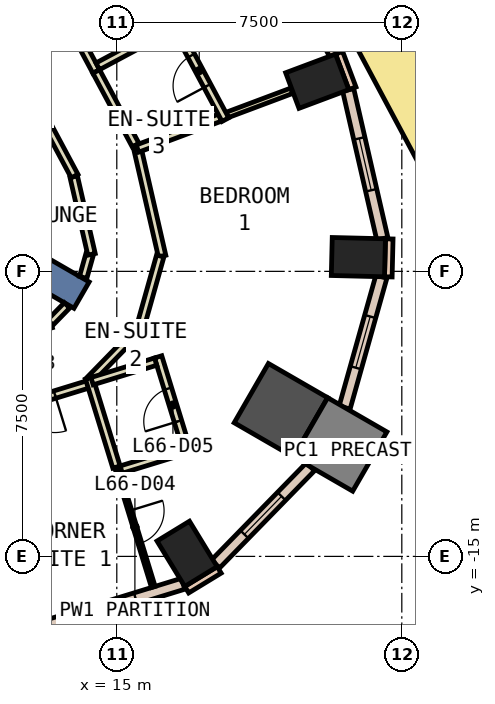
"""IFC4 building model, lengths in metres.
Left out: names, types, materials, properties, quantities, classifications, styles, units other than length and angle.
Written with IfcOpenShell. Run it as: python <this file> out.ifc"""

import sys

from ifc_helpers import new_model, si_unit, direction, frame, frame_2d, origin, origin_2d, place, context, subcontext, project, spatial, rectangle, extrude, element, fill, save


model = new_model("IFC4")
c1 = context("Model", 3, precision=1e-05, world=origin(), true_north=direction((0.0, 1.0)))
c2 = subcontext(c1, "Body", "Model", "MODEL_VIEW")
j1 = project(units=[si_unit("LENGTHUNIT", "METRE"), si_unit("PLANEANGLEUNIT", "RADIAN")], contexts=[c1])
p1 = place(None, origin())
s1 = spatial("IfcSite", under=j1, at=p1, CompositionType="ELEMENT")
p2 = place(p1, origin())
s2 = spatial("IfcBuilding", under=s1, at=p2, CompositionType="ELEMENT")
p3 = place(p2, frame((0.0, 0.0, 286.4)))
s3 = spatial("IfcBuildingStorey", under=s2, at=p3, CompositionType="ELEMENT", Elevation=286.4)
p4 = place(p3, frame((16.85, -14.933, 0.0), z_axis=(0.0, 0.0, 1.0), x_axis=(0.853650808213, 0.520845752251, 0.0)))
e1 = element("IfcColumn", 1, at=p4, inside=s3, PredefinedType="COLUMN", context=c2, shape_type="SweptSolid", body=[
    extrude(rectangle(XDim=1.0, YDim=1.4, at=origin_2d()), origin(), (0.0, 0.0, 1.0), 3.26),
])
p5 = place(p3, frame((19.319, -11.154, 0.0), z_axis=(0.0, 0.0, 1.0), x_axis=(-0.866025403784, 0.5, 0.0)))
e2 = element("IfcColumn", 2, at=p5, inside=s3, PredefinedType="COLUMN", context=c2, shape_type="SweptSolid", body=[
    extrude(rectangle(XDim=1.8, YDim=1.8, at=origin_2d()), origin(), (0.0, 0.0, 1.0), 3.26),
])
for number, where, z_axis, x_axis in (
    (3, (21.357, -7.126, 0.0), (0.0, 0.0, 1.0), (0.024, 1.0, 0.0)),
    (4, (20.275, -2.497, 0.0), (0.0, 0.0, 1.0), (-0.351, 0.936, 0.0)),
):
    element("IfcColumn", number, at=place(p3, frame(where, z_axis=z_axis, x_axis=x_axis)), inside=s3, PredefinedType="COLUMN", context=c2, shape_type="SweptSolid", body=[
        extrude(rectangle(XDim=1.0, YDim=1.4, at=origin_2d()), origin(), (0.0, 0.0, 1.0), 3.26),
    ])
p6 = place(p3, frame((20.878, -12.054, 0.0), z_axis=(0.0, 0.0, 1.0), x_axis=(-0.866025403784, 0.5, 0.0)))
e5 = element("IfcColumn", 5, at=p6, inside=s3, PredefinedType="COLUMN", context=c2, shape_type="SweptSolid", body=[
    extrude(rectangle(XDim=1.8, YDim=1.8, at=origin_2d()), origin(), (0.0, 0.0, 1.0), 3.26),
])
p7 = place(p3, frame((6.279, -3.625, -0.6), z_axis=(0.0, 0.0, 1.0), x_axis=(0.866017533419, -0.500013631625, 0.0)))
e6 = element("IfcWall", 6, at=p7, inside=s3, PredefinedType="SHEAR", context=c2, shape_type="SweptSolid", body=[
    extrude(rectangle(XDim=9.0, YDim=0.8, at=frame_2d((4.5, 0.0))), origin(), (0.0, 0.0, 1.0), 3.86),
])
p8 = place(p3, frame((21.2, -2.684, 0.0), z_axis=(0.0, 0.0, 1.0), x_axis=(-0.350962844851, 0.936389385637, 0.0)))
e7 = element("IfcWall", 7, at=p8, inside=s3, PredefinedType="STANDARD", context=c2, shape_type="SweptSolid", body=[
    extrude(rectangle(XDim=1.0, YDim=0.2, at=frame_2d((0.5, 0.0))), origin(), (0.0, 0.0, 1.0), 3.26),
])
p9 = place(p3, frame((16.84, -15.876, 0.0), z_axis=(0.0, 0.0, 1.0), x_axis=(0.853679739553, 0.520798331677, 0.0)))
e8 = element("IfcWall", 8, at=p9, inside=s3, PredefinedType="STANDARD", context=c2, shape_type="SweptSolid", body=[
    extrude(rectangle(XDim=1.0, YDim=0.2, at=frame_2d((0.5, 0.0))), origin(), (0.0, 0.0, 1.0), 3.26),
])
p10 = place(p3, frame((22.145, -7.645, 0.0), z_axis=(0.0, 0.0, 1.0), x_axis=(0.023942303888, 0.999713341956, 0.0)))
e9 = element("IfcWall", 9, at=p10, inside=s3, PredefinedType="STANDARD", context=c2, shape_type="SweptSolid", body=[
    extrude(rectangle(XDim=0.999, YDim=0.2, at=frame_2d((0.5, 0.0))), origin(), (0.0, 0.0, 1.0), 3.26),
])
p11 = place(p3, frame((12.904, -16.901, 0.0), z_axis=(0.0, 0.0, 1.0), x_axis=(0.955866957005, 0.293799864716, 0.0)))
e10 = element("IfcWall", 10, at=p11, inside=s3, PredefinedType="STANDARD", context=c2, shape_type="SweptSolid", body=[
    extrude(rectangle(XDim=4.02, YDim=0.3, at=frame_2d((2.01, 0.0))), origin(), (0.0, 0.0, 1.0), 3.26),
])
p12 = place(p11, frame((1.31, 0.0, 0.9)))
e11 = element("IfcOpeningElement", 11, at=p12, cuts=e10, PredefinedType="OPENING", context=c2, shape_type="SweptSolid", body=[
    extrude(rectangle(XDim=1.4, YDim=2.0, at=frame_2d((0.7, 1.0))), frame((0.0, 0.16, 0.0), z_axis=(0.0, -1.0, 0.0), x_axis=(1.0, 0.0, 0.0)), (0.0, 0.0, 1.0), 0.32),
])
p13 = place(p3, frame((17.598, -15.2, 0.0), z_axis=(0.0, 0.0, 1.0), x_axis=(0.698555868355, 0.715555517614, 0.0)))
e12 = element("IfcWall", 12, at=p13, inside=s3, PredefinedType="STANDARD", context=c2, shape_type="SweptSolid", body=[
    extrude(rectangle(XDim=3.576, YDim=0.3, at=frame_2d((1.788, 0.0))), origin(), (0.0, 0.0, 1.0), 3.26),
])
p14 = place(p13, frame((1.088, 0.0, 0.9)))
e13 = element("IfcOpeningElement", 13, at=p14, cuts=e12, PredefinedType="OPENING", context=c2, shape_type="SweptSolid", body=[
    extrude(rectangle(XDim=1.4, YDim=2.0, at=frame_2d((0.7, 1.0))), frame((0.0, 0.16, 0.0), z_axis=(0.0, -1.0, 0.0), x_axis=(1.0, 0.0, 0.0)), (0.0, 0.0, 1.0), 0.32),
])
p15 = place(p3, frame((20.995, -11.083, 0.0), z_axis=(0.0, 0.0, 1.0), x_axis=(0.270589405397, 0.962694849725, 0.0)))
e14 = element("IfcWall", 14, at=p15, inside=s3, PredefinedType="STANDARD", context=c2, shape_type="SweptSolid", body=[
    extrude(rectangle(XDim=3.577, YDim=0.3, at=frame_2d((1.788, 0.0))), origin(), (0.0, 0.0, 1.0), 3.26),
])
p16 = place(p15, frame((1.088, 0.0, 0.9)))
e15 = element("IfcOpeningElement", 15, at=p16, cuts=e14, PredefinedType="OPENING", context=c2, shape_type="SweptSolid", body=[
    extrude(rectangle(XDim=1.4, YDim=2.0, at=frame_2d((0.7, 1.0))), frame((0.0, 0.16, 0.0), z_axis=(0.0, -1.0, 0.0), x_axis=(1.0, 0.0, 0.0)), (0.0, 0.0, 1.0), 0.32),
])
p17 = place(p3, frame((21.987, -6.642, 0.0), z_axis=(0.0, 0.0, 1.0), x_axis=(-0.223448307338, 0.974715781112, 0.0)))
e16 = element("IfcWall", 16, at=p17, inside=s3, PredefinedType="STANDARD", context=c2, shape_type="SweptSolid", body=[
    extrude(rectangle(XDim=4.019, YDim=0.3, at=frame_2d((2.009, 0.0))), origin(), (0.0, 0.0, 1.0), 3.26),
])
p18 = place(p17, frame((1.309, 0.0, 0.9)))
e17 = element("IfcOpeningElement", 17, at=p18, cuts=e16, PredefinedType="OPENING", context=c2, shape_type="SweptSolid", body=[
    extrude(rectangle(XDim=1.4, YDim=2.0, at=frame_2d((0.7, 1.0))), frame((0.0, 0.16, 0.0), z_axis=(0.0, -1.0, 0.0), x_axis=(1.0, 0.0, 0.0)), (0.0, 0.0, 1.0), 0.32),
])
p19 = place(p3, frame((20.739, -1.79, 0.0), z_axis=(0.0, 0.0, 1.0), x_axis=(-0.471789353675, 0.881711293882, 0.0)))
e18 = element("IfcWall", 18, at=p19, inside=s3, PredefinedType="STANDARD", context=c2, shape_type="SweptSolid", body=[
    extrude(rectangle(XDim=7.277, YDim=0.3, at=frame_2d((3.638, 0.0))), origin(), (0.0, 0.0, 1.0), 3.26),
])
p20 = place(p19, frame((0.719, 0.0, 0.9)))
e19 = element("IfcOpeningElement", 19, at=p20, cuts=e18, PredefinedType="OPENING", context=c2, shape_type="SweptSolid", body=[
    extrude(rectangle(XDim=2.2, YDim=2.0, at=frame_2d((1.1, 1.0))), frame((0.0, 0.16, 0.0), z_axis=(0.0, -1.0, 0.0), x_axis=(1.0, 0.0, 0.0)), (0.0, 0.0, 1.0), 0.32),
])
p21 = place(p19, frame((4.358, 0.0, 0.9)))
e20 = element("IfcOpeningElement", 20, at=p21, cuts=e18, PredefinedType="OPENING", context=c2, shape_type="SweptSolid", body=[
    extrude(rectangle(XDim=2.2, YDim=2.0, at=frame_2d((1.1, 1.0))), frame((0.0, 0.16, 0.0), z_axis=(0.0, -1.0, 0.0), x_axis=(1.0, 0.0, 0.0)), (0.0, 0.0, 1.0), 0.32),
])
p22 = place(p3, frame((23.847, -4.337, 0.0), z_axis=(0.0, 0.0, 1.0), x_axis=(-0.470902401725, 0.882185313894, 0.0)))
e21 = element("IfcWall", 21, at=p22, inside=s3, PredefinedType="STANDARD", context=c2, shape_type="SweptSolid", body=[
    extrude(rectangle(XDim=4.799, YDim=1.9, at=frame_2d((2.4, 0.0))), origin(), (0.0, 0.0, 1.0), 0.8),
])
p23 = place(p3, frame((11.239, -9.514, 0.0), z_axis=(0.0, 0.0, 1.0), x_axis=(0.955838469047, 0.293892533234, 0.0)))
e22 = element("IfcWall", 22, at=p23, inside=s3, PredefinedType="PARTITIONING", context=c2, shape_type="SweptSolid", body=[
    extrude(rectangle(XDim=2.13, YDim=0.2, at=frame_2d((1.065, 0.0))), origin(), (0.0, 0.0, 1.0), 3.26),
])
p24 = place(p3, frame((13.25, -8.846, 0.0), z_axis=(0.0, 0.0, 1.0), x_axis=(0.698333537371, 0.715772499181, 0.0)))
e23 = element("IfcWall", 23, at=p24, inside=s3, PredefinedType="PARTITIONING", context=c2, shape_type="SweptSolid", body=[
    extrude(rectangle(XDim=0.63, YDim=0.2, at=frame_2d((0.315, 0.0))), origin(), (0.0, 0.0, 1.0), 3.26),
])
p25 = place(p3, frame((14.115, -7.659, 0.0), z_axis=(0.0, 0.0, 1.0), x_axis=(0.270633612894, 0.96268242301, 0.0)))
e24 = element("IfcWall", 24, at=p25, inside=s3, PredefinedType="PARTITIONING", context=c2, shape_type="SweptSolid", body=[
    extrude(rectangle(XDim=0.632, YDim=0.2, at=frame_2d((0.316, 0.0))), origin(), (0.0, 0.0, 1.0), 3.26),
])
p26 = place(p3, frame((14.335, -7.052, 0.0), z_axis=(0.0, 0.0, 1.0), x_axis=(-0.22355315143, 0.974691740237, 0.0)))
e25 = element("IfcWall", 25, at=p26, inside=s3, PredefinedType="PARTITIONING", context=c2, shape_type="SweptSolid", body=[
    extrude(rectangle(XDim=2.102, YDim=0.2, at=frame_2d((1.051, 0.0))), origin(), (0.0, 0.0, 1.0), 3.26),
])
p27 = place(p3, frame((13.89, -4.994, 0.0), z_axis=(0.0, 0.0, 1.0), x_axis=(-0.471713767504, 0.881751734644, 0.0)))
e26 = element("IfcWall", 26, at=p27, inside=s3, PredefinedType="PARTITIONING", context=c2, shape_type="SweptSolid", body=[
    extrude(rectangle(XDim=7.248, YDim=0.2, at=frame_2d((3.624, 0.0))), origin(), (0.0, 0.0, 1.0), 3.26),
])
p28 = place(p27, frame((2.724, 0.0, 0.0)))
e27 = element("IfcOpeningElement", 27, at=p28, cuts=e26, PredefinedType="OPENING", context=c2, shape_type="SweptSolid", body=[
    extrude(rectangle(XDim=1.8, YDim=2.1, at=frame_2d((0.9, 1.05))), frame((0.0, 0.11, 0.0), z_axis=(0.0, -1.0, 0.0), x_axis=(1.0, 0.0, 0.0)), (0.0, 0.0, 1.0), 0.22),
])
p29 = place(p3, frame((14.243, -10.474, 0.0), z_axis=(0.0, 0.0, 1.0), x_axis=(-0.955937788993, -0.293569316475, 0.0)))
e28 = element("IfcWall", 28, at=p29, inside=s3, PredefinedType="PARTITIONING", context=c2, shape_type="SweptSolid", body=[
    extrude(rectangle(XDim=2.823, YDim=0.2, at=frame_2d((1.412, 0.0))), origin(), (0.0, 0.0, 1.0), 3.26),
])
p30 = place(p29, frame((0.912, 0.0, 0.0)))
e29 = element("IfcOpeningElement", 29, at=p30, cuts=e28, PredefinedType="OPENING", context=c2, shape_type="SweptSolid", body=[
    extrude(rectangle(XDim=1.0, YDim=2.1, at=frame_2d((0.5, 1.05))), frame((0.0, 0.11, 0.0), z_axis=(0.0, -1.0, 0.0), x_axis=(1.0, 0.0, 0.0)), (0.0, 0.0, 1.0), 0.22),
])
p31 = place(p3, frame((15.521, -4.171, 0.0), z_axis=(0.0, 0.0, 1.0), x_axis=(0.223416387785, -0.974723097946, 0.0)))
e30 = element("IfcWall", 30, at=p31, inside=s3, PredefinedType="PARTITIONING", context=c2, shape_type="SweptSolid", body=[
    extrude(rectangle(XDim=3.003, YDim=0.2, at=frame_2d((1.501, 0.0))), origin(), (0.0, 0.0, 1.0), 3.26),
])
p32 = place(p3, frame((16.143, -7.096, 0.0), z_axis=(0.0, 0.0, 1.0), x_axis=(-0.270688011946, -0.962667128445, 0.0)))
e31 = element("IfcWall", 31, at=p32, inside=s3, PredefinedType="PARTITIONING", context=c2, shape_type="SweptSolid", body=[
    extrude(rectangle(XDim=2.088, YDim=0.2, at=frame_2d((1.044, 0.0))), origin(), (0.0, 0.0, 1.0), 3.26),
])
p33 = place(p3, frame((15.535, -9.081, 0.0), z_axis=(0.0, 0.0, 1.0), x_axis=(-0.698342132704, -0.715764113162, 0.0)))
e32 = element("IfcWall", 32, at=p33, inside=s3, PredefinedType="PARTITIONING", context=c2, shape_type="SweptSolid", body=[
    extrude(rectangle(XDim=1.836, YDim=0.2, at=frame_2d((0.918, 0.0))), origin(), (0.0, 0.0, 1.0), 3.26),
])
p34 = place(p3, frame((12.009, 2.338, 0.0), z_axis=(0.0, 0.0, 1.0), x_axis=(0.471771260231, -0.88172097515, 0.0)))
e33 = element("IfcWall", 33, at=p34, inside=s3, PredefinedType="PARTITIONING", context=c2, shape_type="SweptSolid", body=[
    extrude(rectangle(XDim=5.193, YDim=0.2, at=frame_2d((2.597, 0.0))), origin(), (0.0, 0.0, 1.0), 3.26),
])
p35 = place(p34, frame((2.146, 0.0, 0.0)))
e34 = element("IfcOpeningElement", 34, at=p35, cuts=e33, PredefinedType="OPENING", context=c2, shape_type="SweptSolid", body=[
    extrude(rectangle(XDim=1.0, YDim=2.1, at=frame_2d((0.5, 1.05))), frame((0.0, 0.11, 0.0), z_axis=(0.0, -1.0, 0.0), x_axis=(1.0, 0.0, 0.0)), (0.0, 0.0, 1.0), 0.22),
])
p36 = place(p3, frame((14.459, -2.241, 0.0), z_axis=(0.0, 0.0, 1.0), x_axis=(0.471648235011, -0.881786789656, 0.0)))
e35 = element("IfcWall", 35, at=p36, inside=s3, PredefinedType="PARTITIONING", context=c2, shape_type="SweptSolid", body=[
    extrude(rectangle(XDim=2.199, YDim=0.2, at=frame_2d((1.1, 0.0))), origin(), (0.0, 0.0, 1.0), 3.26),
])
p37 = place(p3, frame((14.992, -12.65, 0.0), z_axis=(0.0, 0.0, 1.0), x_axis=(0.293675064948, -0.955905307145, 0.0)))
e36 = element("IfcWall", 36, at=p37, inside=s3, PredefinedType="PARTITIONING", context=c2, shape_type="SweptSolid", body=[
    extrude(rectangle(XDim=3.3, YDim=0.1, at=frame_2d((1.65, 0.0))), origin(), (0.0, 0.0, 1.0), 3.26),
])
p38 = place(p37, frame((1.2, 0.0, 0.0)))
e37 = element("IfcOpeningElement", 37, at=p38, cuts=e36, PredefinedType="OPENING", context=c2, shape_type="SweptSolid", body=[
    extrude(rectangle(XDim=0.9, YDim=2.1, at=frame_2d((0.45, 1.05))), frame((0.0, 0.06, 0.0), z_axis=(0.0, -1.0, 0.0), x_axis=(1.0, 0.0, 0.0)), (0.0, 0.0, 1.0), 0.12),
])
p39 = place(p3, frame((14.272, -10.308, 0.0), z_axis=(0.0, 0.0, 1.0), x_axis=(0.293868765171, -0.955845776711, 0.0)))
e38 = element("IfcWall", 38, at=p39, inside=s3, PredefinedType="PARTITIONING", context=c2, shape_type="SweptSolid", body=[
    extrude(rectangle(XDim=2.45, YDim=0.2, at=frame_2d((1.225, 0.0))), origin(), (0.0, 0.0, 1.0), 3.26),
])
p40 = place(p3, frame((15.117, -12.716, 0.0), z_axis=(0.0, 0.0, 1.0), x_axis=(0.955940341053, 0.293561006177, 0.0)))
e39 = element("IfcWall", 39, at=p40, inside=s3, PredefinedType="PARTITIONING", context=c2, shape_type="SweptSolid", body=[
    extrude(rectangle(XDim=1.7, YDim=0.2, at=frame_2d((0.85, 0.0))), origin(), (0.0, 0.0, 1.0), 3.26),
])
p41 = place(p3, frame((16.867, -12.283, 0.0), z_axis=(0.0, 0.0, 1.0), x_axis=(-0.29397579302, 0.955812865114, 0.0)))
e40 = element("IfcWall", 40, at=p41, inside=s3, PredefinedType="PARTITIONING", context=c2, shape_type="SweptSolid", body=[
    extrude(rectangle(XDim=2.65, YDim=0.2, at=frame_2d((1.325, 0.0))), origin(), (0.0, 0.0, 1.0), 3.26),
])
p42 = place(p41, frame((0.875, 0.0, 0.0)))
e41 = element("IfcOpeningElement", 41, at=p42, cuts=e40, PredefinedType="OPENING", context=c2, shape_type="SweptSolid", body=[
    extrude(rectangle(XDim=0.9, YDim=2.1, at=frame_2d((0.45, 1.05))), frame((0.0, 0.11, 0.0), z_axis=(0.0, -1.0, 0.0), x_axis=(1.0, 0.0, 0.0)), (0.0, 0.0, 1.0), 0.22),
])
p43 = place(p3, frame((16.022, -9.875, 0.0), z_axis=(0.0, 0.0, 1.0), x_axis=(-0.955908620472, -0.293664279932, 0.0)))
e42 = element("IfcWall", 42, at=p43, inside=s3, PredefinedType="PARTITIONING", context=c2, shape_type="SweptSolid", body=[
    extrude(rectangle(XDim=1.75, YDim=0.2, at=frame_2d((0.875, 0.0))), origin(), (0.0, 0.0, 1.0), 3.26),
])
p44 = place(p3, frame((17.904, -3.385, 0.0), z_axis=(0.0, 0.0, 1.0), x_axis=(0.936401128709, 0.350931512054, 0.0)))
e43 = element("IfcWall", 43, at=p44, inside=s3, PredefinedType="PARTITIONING", context=c2, shape_type="SweptSolid", body=[
    extrude(rectangle(XDim=1.812, YDim=0.15, at=frame_2d((0.906, 0.0))), origin(), (0.0, 0.0, 1.0), 3.26),
])
p45 = place(p3, frame((15.544, -4.269, 0.0), z_axis=(0.0, 0.0, 1.0), x_axis=(0.936463142424, 0.350765994477, 0.0)))
e44 = element("IfcWall", 44, at=p45, inside=s3, PredefinedType="PARTITIONING", context=c2, shape_type="SweptSolid", body=[
    extrude(rectangle(XDim=2.321, YDim=0.2, at=frame_2d((1.16, 0.0))), origin(), (0.0, 0.0, 1.0), 3.26),
])
p46 = place(p3, frame((17.857, -3.508, 0.0), z_axis=(0.0, 0.0, 1.0), x_axis=(-0.47112614664, 0.882065844454, 0.0)))
e45 = element("IfcWall", 45, at=p46, inside=s3, PredefinedType="PARTITIONING", context=c2, shape_type="SweptSolid", body=[
    extrude(rectangle(XDim=2.921, YDim=0.2, at=frame_2d((1.46, 0.0))), origin(), (0.0, 0.0, 1.0), 3.26),
])
p47 = place(p46, frame((1.01, 0.0, 0.0)))
e46 = element("IfcOpeningElement", 46, at=p47, cuts=e45, PredefinedType="OPENING", context=c2, shape_type="SweptSolid", body=[
    extrude(rectangle(XDim=0.9, YDim=2.1, at=frame_2d((0.45, 1.05))), frame((0.0, 0.11, 0.0), z_axis=(0.0, -1.0, 0.0), x_axis=(1.0, 0.0, 0.0)), (0.0, 0.0, 1.0), 0.22),
])
p48 = place(p3, frame((16.44, -1.067, 0.0), z_axis=(0.0, 0.0, 1.0), x_axis=(-0.881700916894, -0.471808746367, 0.0)))
e47 = element("IfcWall", 47, at=p48, inside=s3, PredefinedType="PARTITIONING", context=c2, shape_type="SweptSolid", body=[
    extrude(rectangle(XDim=2.2, YDim=0.2, at=frame_2d((1.1, 0.0))), origin(), (0.0, 0.0, 1.0), 3.26),
])
p49 = place(p12, origin())
e48 = element("IfcWindow", 48, at=p49, inside=s3, PartitioningType="SINGLE_PANEL", PredefinedType="WINDOW", context=c2, shape_type="SweptSolid", body=[
    extrude(rectangle(XDim=1.4, YDim=2.0, at=frame_2d((0.7, 1.0))), frame((0.0, 0.03, 0.0), z_axis=(0.0, -1.0, 0.0), x_axis=(1.0, 0.0, 0.0)), (0.0, 0.0, 1.0), 0.06),
])
fill(e11, e48)
p50 = place(p14, origin())
e49 = element("IfcWindow", 49, at=p50, inside=s3, PartitioningType="SINGLE_PANEL", PredefinedType="WINDOW", context=c2, shape_type="SweptSolid", body=[
    extrude(rectangle(XDim=1.4, YDim=2.0, at=frame_2d((0.7, 1.0))), frame((0.0, 0.03, 0.0), z_axis=(0.0, -1.0, 0.0), x_axis=(1.0, 0.0, 0.0)), (0.0, 0.0, 1.0), 0.06),
])
fill(e13, e49)
p51 = place(p16, origin())
e50 = element("IfcWindow", 50, at=p51, inside=s3, PartitioningType="SINGLE_PANEL", PredefinedType="WINDOW", context=c2, shape_type="SweptSolid", body=[
    extrude(rectangle(XDim=1.4, YDim=2.0, at=frame_2d((0.7, 1.0))), frame((0.0, 0.03, 0.0), z_axis=(0.0, -1.0, 0.0), x_axis=(1.0, 0.0, 0.0)), (0.0, 0.0, 1.0), 0.06),
])
fill(e15, e50)
p52 = place(p18, origin())
e51 = element("IfcWindow", 51, at=p52, inside=s3, PartitioningType="SINGLE_PANEL", PredefinedType="WINDOW", context=c2, shape_type="SweptSolid", body=[
    extrude(rectangle(XDim=1.4, YDim=2.0, at=frame_2d((0.7, 1.0))), frame((0.0, 0.03, 0.0), z_axis=(0.0, -1.0, 0.0), x_axis=(1.0, 0.0, 0.0)), (0.0, 0.0, 1.0), 0.06),
])
fill(e17, e51)
p53 = place(p30, origin())
e52 = element("IfcDoor", 52, at=p53, inside=s3, OperationType="SINGLE_SWING_LEFT", PredefinedType="DOOR", context=c2, shape_type="SweptSolid", body=[
    extrude(rectangle(XDim=1.0, YDim=2.1, at=frame_2d((0.5, 1.05))), frame((0.0, 0.025, 0.0), z_axis=(0.0, -1.0, 0.0), x_axis=(1.0, 0.0, 0.0)), (0.0, 0.0, 1.0), 0.05),
])
fill(e29, e52)
p54 = place(p38, origin())
e53 = element("IfcDoor", 53, at=p54, inside=s3, OperationType="SINGLE_SWING_LEFT", PredefinedType="DOOR", context=c2, shape_type="SweptSolid", body=[
    extrude(rectangle(XDim=0.9, YDim=2.1, at=frame_2d((0.45, 1.05))), frame((0.0, 0.025, 0.0), z_axis=(0.0, -1.0, 0.0), x_axis=(1.0, 0.0, 0.0)), (0.0, 0.0, 1.0), 0.05),
])
fill(e37, e53)
p55 = place(p42, origin())
e54 = element("IfcDoor", 54, at=p55, inside=s3, OperationType="SINGLE_SWING_LEFT", PredefinedType="DOOR", context=c2, shape_type="SweptSolid", body=[
    extrude(rectangle(XDim=0.9, YDim=2.1, at=frame_2d((0.45, 1.05))), frame((0.0, 0.025, 0.0), z_axis=(0.0, -1.0, 0.0), x_axis=(1.0, 0.0, 0.0)), (0.0, 0.0, 1.0), 0.05),
])
fill(e41, e54)
p56 = place(p47, origin())
e55 = element("IfcDoor", 55, at=p56, inside=s3, OperationType="SINGLE_SWING_RIGHT", PredefinedType="DOOR", context=c2, shape_type="SweptSolid", body=[
    extrude(rectangle(XDim=0.9, YDim=2.1, at=frame_2d((0.45, 1.05))), frame((0.0, 0.025, 0.0), z_axis=(0.0, -1.0, 0.0), x_axis=(1.0, 0.0, 0.0)), (0.0, 0.0, 1.0), 0.05),
])
fill(e46, e55)
save(model, sys.argv[1])
